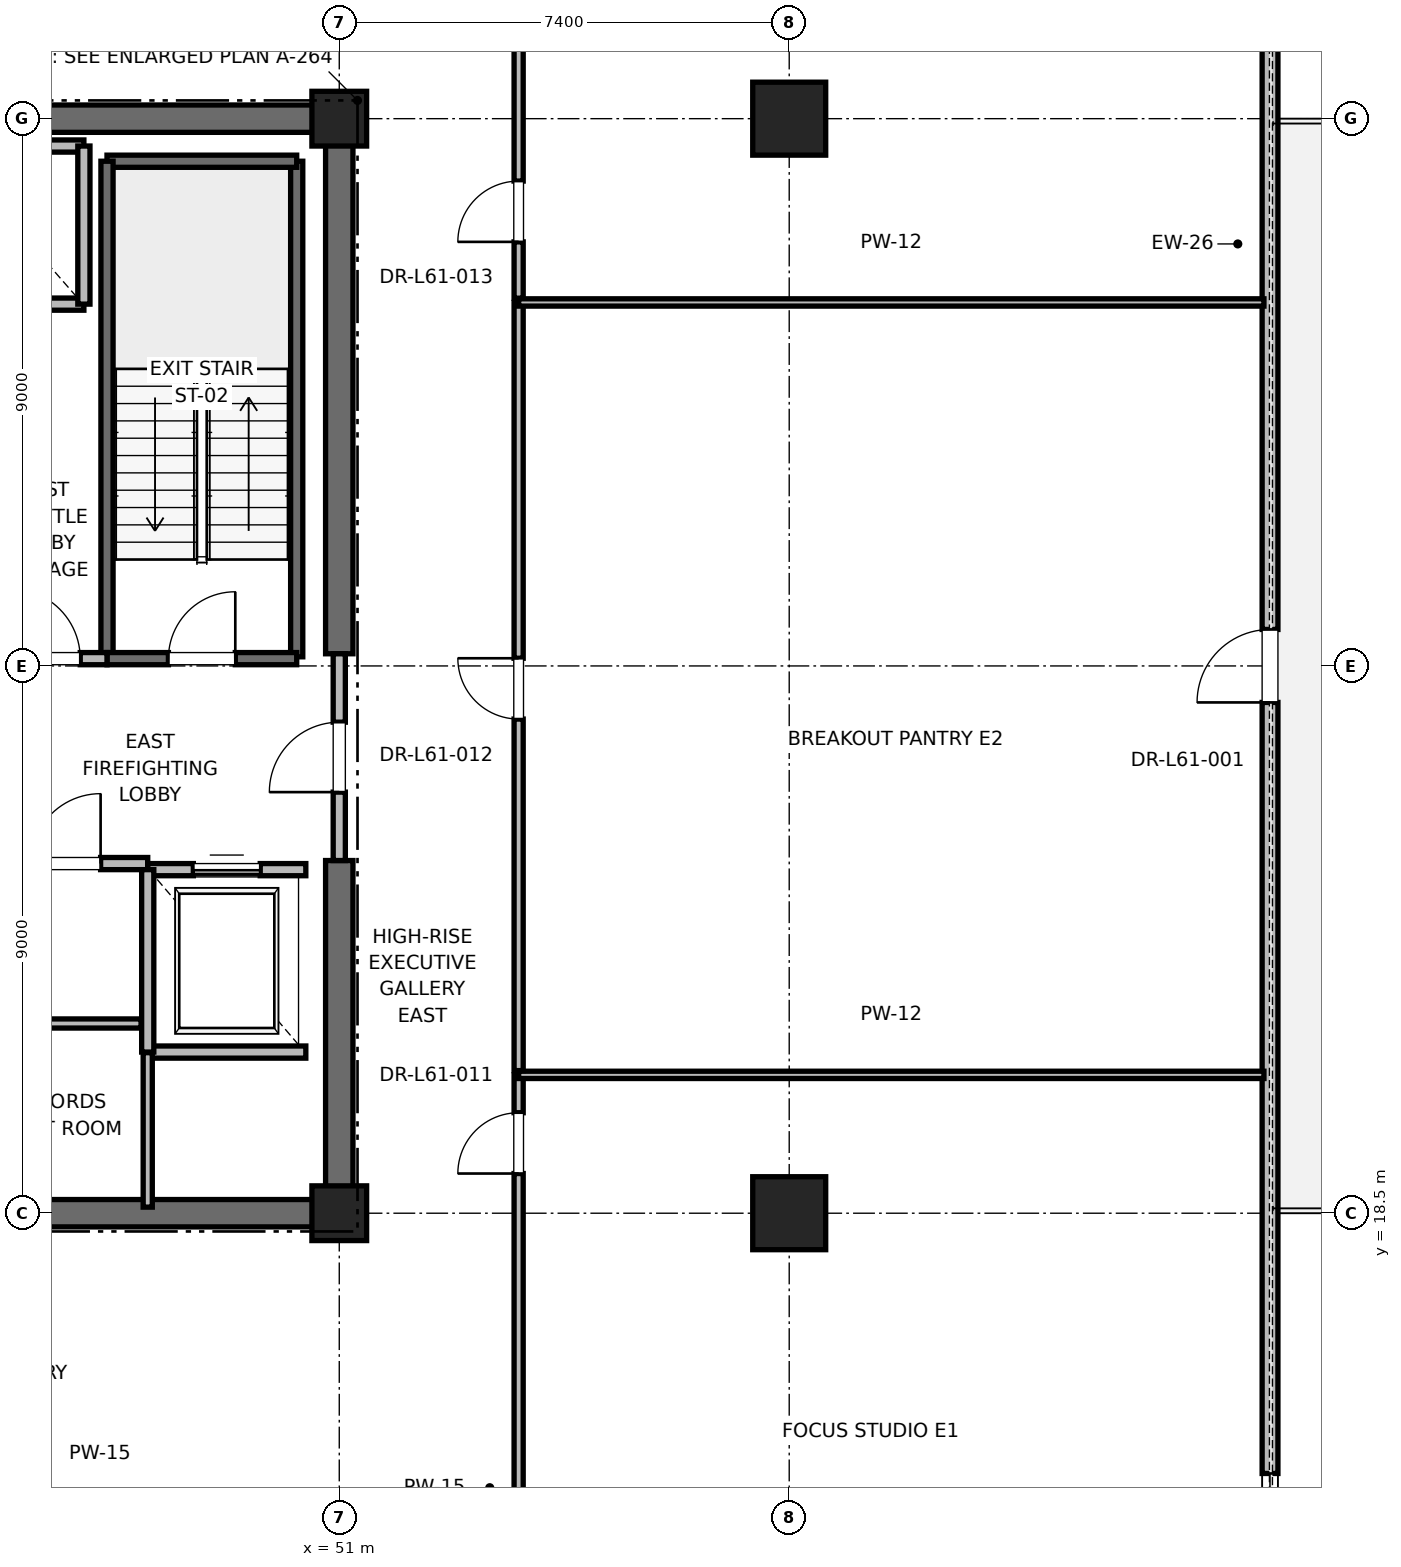
"""IFC4 building model, lengths in metres.
Left out: names, types, materials, properties, quantities, classifications, styles, units other than length and angle.
Written with IfcOpenShell. Run it as: python <this file> out.ifc"""

import sys

from ifc_helpers import new_model, si_unit, direction, frame, frame_2d, origin, origin_2d, place, context, subcontext, project, spatial, rectangle, extrude, element, fill, save


model = new_model("IFC4")
c1 = context("Model", 3, precision=1e-05, world=origin(), true_north=direction((0.0, 1.0)))
c2 = subcontext(c1, "Body", "Model", "MODEL_VIEW")
j1 = project(units=[si_unit("LENGTHUNIT", "METRE"), si_unit("PLANEANGLEUNIT", "RADIAN")], contexts=[c1])
p1 = place(None, origin())
s1 = spatial("IfcSite", under=j1, at=p1, CompositionType="ELEMENT")
p2 = place(p1, origin())
s2 = spatial("IfcBuilding", under=s1, at=p2, CompositionType="ELEMENT")
p3 = place(p2, frame((0.0, 0.0, 263.2)))
s3 = spatial("IfcBuildingStorey", under=s2, at=p3, CompositionType="ELEMENT", Elevation=263.2)
for number, where, z_axis, x_axis in (
    (1, (58.4, 18.5, 0.0), (0.0, 0.0, 1.0), (1.0, 0.0, 0.0)),
    (2, (58.4, 36.5, 0.0), (0.0, 0.0, 1.0), (1.0, 0.0, 0.0)),
):
    element("IfcColumn", number, at=place(p3, frame(where, z_axis=z_axis, x_axis=x_axis)), inside=s3, PredefinedType="COLUMN", context=c2, shape_type="SweptSolid", body=[
        extrude(rectangle(XDim=1.2, YDim=1.2, at=origin_2d()), origin(), (0.0, 0.0, 1.0), 4.0),
    ])
for number, where, z_axis, x_axis in (
    (3, (51.0, 18.5, 0.0), (0.0, 0.0, 1.0), (1.0, 0.0, 0.0)),
    (4, (51.0, 36.5, 0.0), (0.0, 0.0, 1.0), (1.0, 0.0, 0.0)),
):
    element("IfcColumn", number, at=place(p3, frame(where, z_axis=z_axis, x_axis=x_axis)), inside=s3, PredefinedType="PILASTER", context=c2, shape_type="SweptSolid", body=[
        extrude(rectangle(XDim=0.9, YDim=0.9, at=origin_2d()), origin(), (0.0, 0.0, 1.0), 4.0),
    ])
p4 = place(p3, frame((41.8, 18.5, 0.0), z_axis=(0.0, 0.0, 1.0), x_axis=(1.0, 0.0, 0.0)))
e5 = element("IfcWall", 5, at=p4, inside=s3, PredefinedType="SHEAR", context=c2, shape_type="SweptSolid", body=[
    extrude(rectangle(XDim=9.2, YDim=0.45, at=frame_2d((4.6, 0.0))), origin(), (0.0, 0.0, 1.0), 3.785),
])
for number, where, z_axis, x_axis in (
    (6, (45.2, 36.5, 0.0), (0.0, 0.0, 1.0), (1.0, 0.0, 0.0)),
    (7, (51.0, 18.5, 0.0), (0.0, 0.0, 1.0), (0.0, 1.0, 0.0)),
):
    element("IfcWall", number, at=place(p3, frame(where, z_axis=z_axis, x_axis=x_axis)), inside=s3, PredefinedType="SHEAR", context=c2, shape_type="SweptSolid", body=[
        extrude(rectangle(XDim=5.8, YDim=0.45, at=frame_2d((2.9, 0.0))), origin(), (0.0, 0.0, 1.0), 3.785),
    ])
p5 = place(p3, frame((51.0, 27.7, 0.0), z_axis=(0.0, 0.0, 1.0), x_axis=(0.0, 1.0, 0.0)))
e8 = element("IfcWall", 8, at=p5, inside=s3, PredefinedType="SHEAR", context=c2, shape_type="SweptSolid", body=[
    extrude(rectangle(XDim=8.8, YDim=0.45, at=frame_2d((4.4, 0.0))), origin(), (0.0, 0.0, 1.0), 3.785),
])
p6 = place(p3, frame((66.308, 8.42, 0.0), z_axis=(0.0, 0.0, 1.0), x_axis=(0.0, 1.0, 0.0)))
e9 = element("IfcWall", 9, at=p6, inside=s3, PredefinedType="PARAPET", context=c2, shape_type="SweptSolid", body=[
    extrude(rectangle(XDim=38.16, YDim=0.26, at=frame_2d((19.08, 0.0))), origin(), (0.0, 0.0, 1.0), 3.123),
])
p7 = place(p6, frame((4.2, 0.0, 0.85)))
e10 = element("IfcOpeningElement", 10, at=p7, cuts=e9, PredefinedType="OPENING", context=c2, shape_type="SweptSolid", body=[
    extrude(rectangle(XDim=1.6, YDim=2.1, at=frame_2d((0.8, 1.05))), frame((0.0, 0.13, 0.0), z_axis=(0.0, -1.0, 0.0), x_axis=(1.0, 0.0, 0.0)), (0.0, 0.0, 1.0), 0.26),
])
p8 = place(p6, frame((18.48, 0.0, 0.0)))
e11 = element("IfcOpeningElement", 11, at=p8, cuts=e9, PredefinedType="OPENING", context=c2, shape_type="SweptSolid", body=[
    extrude(rectangle(XDim=1.2, YDim=2.2, at=frame_2d((0.6, 1.1))), frame((0.0, 0.13, 0.0), z_axis=(0.0, -1.0, 0.0), x_axis=(1.0, 0.0, 0.0)), (0.0, 0.0, 1.0), 0.26),
])
p9 = place(p6, frame((32.36, 0.0, 0.85)))
e12 = element("IfcOpeningElement", 12, at=p9, cuts=e9, PredefinedType="OPENING", context=c2, shape_type="SweptSolid", body=[
    extrude(rectangle(XDim=1.6, YDim=2.1, at=frame_2d((0.8, 1.05))), frame((0.0, 0.13, 0.0), z_axis=(0.0, -1.0, 0.0), x_axis=(1.0, 0.0, 0.0)), (0.0, 0.0, 1.0), 0.26),
])
p10 = place(p3, frame((50.3, 27.65, 0.0), z_axis=(0.0, 0.0, 1.0), x_axis=(0.0, 1.0, 0.0)))
e13 = element("IfcWall", 13, at=p10, inside=s3, PredefinedType="SOLIDWALL", context=c2, shape_type="SweptSolid", body=[
    extrude(rectangle(XDim=8.15, YDim=0.2, at=frame_2d((4.075, 0.0))), origin(), (0.0, 0.0, 1.0), 3.785),
])
p11 = place(p3, frame((47.18, 35.8, 0.0), z_axis=(0.0, 0.0, 1.0), x_axis=(1.0, 0.0, 0.0)))
e14 = element("IfcWall", 14, at=p11, inside=s3, PredefinedType="SOLIDWALL", context=c2, shape_type="SweptSolid", body=[
    extrude(rectangle(XDim=3.12, YDim=0.2, at=frame_2d((1.56, 0.0))), origin(), (0.0, 0.0, 1.0), 3.785),
])
p12 = place(p3, frame((47.18, 27.62, 0.0), z_axis=(0.0, 0.0, 1.0), x_axis=(0.0, 1.0, 0.0)))
e15 = element("IfcWall", 15, at=p12, inside=s3, PredefinedType="SOLIDWALL", context=c2, shape_type="SweptSolid", body=[
    extrude(rectangle(XDim=8.18, YDim=0.2, at=frame_2d((4.09, 0.0))), origin(), (0.0, 0.0, 1.0), 3.785),
])
p13 = place(p3, frame((47.18, 27.62, 0.0), z_axis=(0.0, 0.0, 1.0), x_axis=(1.0, 0.0, 0.0)))
e16 = element("IfcWall", 16, at=p13, inside=s3, PredefinedType="SOLIDWALL", context=c2, shape_type="SweptSolid", body=[
    extrude(rectangle(XDim=3.12, YDim=0.2, at=frame_2d((1.56, 0.0))), origin(), (0.0, 0.0, 1.0), 3.785),
])
p14 = place(p13, frame((1.01, 0.0, 0.0)))
e17 = element("IfcOpeningElement", 17, at=p14, cuts=e16, PredefinedType="OPENING", context=c2, shape_type="SweptSolid", body=[
    extrude(rectangle(XDim=1.1, YDim=2.15, at=frame_2d((0.55, 1.075))), frame((0.0, 0.1, 0.0), z_axis=(0.0, -1.0, 0.0), x_axis=(1.0, 0.0, 0.0)), (0.0, 0.0, 1.0), 0.2),
])
p15 = place(p3, frame((45.15, 24.25, 0.0), z_axis=(0.0, 0.0, 1.0), x_axis=(1.0, 0.0, 0.0)))
e18 = element("IfcWall", 18, at=p15, inside=s3, PredefinedType="PARTITIONING", context=c2, shape_type="SweptSolid", body=[
    extrude(rectangle(XDim=2.7, YDim=0.2, at=frame_2d((1.35, 0.0))), origin(), (0.0, 0.0, 1.0), 3.785),
])
p16 = place(p15, frame((0.775, 0.0, 0.0)))
e19 = element("IfcOpeningElement", 19, at=p16, cuts=e18, PredefinedType="OPENING", context=c2, shape_type="SweptSolid", body=[
    extrude(rectangle(XDim=1.15, YDim=2.2, at=frame_2d((0.575, 1.1))), frame((0.0, 0.1, 0.0), z_axis=(0.0, -1.0, 0.0), x_axis=(1.0, 0.0, 0.0)), (0.0, 0.0, 1.0), 0.2),
])
p17 = place(p3, frame((45.15, 27.62, 0.0), z_axis=(0.0, 0.0, 1.0), x_axis=(1.0, 0.0, 0.0)))
e20 = element("IfcWall", 20, at=p17, inside=s3, PredefinedType="PARTITIONING", context=c2, shape_type="SweptSolid", body=[
    extrude(rectangle(XDim=2.03, YDim=0.2, at=frame_2d((1.015, 0.0))), origin(), (0.0, 0.0, 1.0), 3.785),
])
p18 = place(p17, frame((0.44, 0.0, 0.0)))
e21 = element("IfcOpeningElement", 21, at=p18, cuts=e20, PredefinedType="OPENING", context=c2, shape_type="SweptSolid", body=[
    extrude(rectangle(XDim=1.15, YDim=2.2, at=frame_2d((0.575, 1.1))), frame((0.0, 0.1, 0.0), z_axis=(0.0, -1.0, 0.0), x_axis=(1.0, 0.0, 0.0)), (0.0, 0.0, 1.0), 0.2),
])
p19 = place(p3, frame((51.0, 24.3, 0.0), z_axis=(0.0, 0.0, 1.0), x_axis=(0.0, 1.0, 0.0)))
e22 = element("IfcWall", 22, at=p19, inside=s3, PredefinedType="PARTITIONING", context=c2, shape_type="SweptSolid", body=[
    extrude(rectangle(XDim=3.4, YDim=0.2, at=frame_2d((1.7, 0.0))), origin(), (0.0, 0.0, 1.0), 2.865),
])
p20 = place(p19, frame((1.125, 0.0, 0.0)))
e23 = element("IfcOpeningElement", 23, at=p20, cuts=e22, PredefinedType="OPENING", context=c2, shape_type="SweptSolid", body=[
    extrude(rectangle(XDim=1.15, YDim=2.2, at=frame_2d((0.575, 1.1))), frame((0.0, 0.1, 0.0), z_axis=(0.0, -1.0, 0.0), x_axis=(1.0, 0.0, 0.0)), (0.0, 0.0, 1.0), 0.2),
])
p21 = place(p3, frame((47.85, 21.15, 0.0), z_axis=(0.0, 0.0, 1.0), x_axis=(1.0, 0.0, 0.0)))
e24 = element("IfcWall", 24, at=p21, inside=s3, PredefinedType="SOLIDWALL", context=c2, shape_type="SweptSolid", body=[
    extrude(rectangle(XDim=2.6, YDim=0.2, at=frame_2d((1.3, 0.0))), origin(), (0.0, 0.0, 1.0), 3.785),
])
p22 = place(p3, frame((50.45, 24.15, 0.0), z_axis=(0.0, 0.0, 1.0), x_axis=(-1.0, 0.0, 0.0)))
e25 = element("IfcWall", 25, at=p22, inside=s3, PredefinedType="SOLIDWALL", context=c2, shape_type="SweptSolid", body=[
    extrude(rectangle(XDim=2.6, YDim=0.2, at=frame_2d((1.3, 0.0))), origin(), (0.0, 0.0, 1.0), 2.865),
])
p23 = place(p22, frame((0.75, 0.0, 0.0)))
e26 = element("IfcOpeningElement", 26, at=p23, cuts=e25, PredefinedType="OPENING", context=c2, shape_type="SweptSolid", body=[
    extrude(rectangle(XDim=1.1, YDim=2.2, at=frame_2d((0.55, 1.1))), frame((0.0, 0.1, 0.0), z_axis=(0.0, -1.0, 0.0), x_axis=(1.0, 0.0, 0.0)), (0.0, 0.0, 1.0), 0.2),
])
p24 = place(p3, frame((47.85, 24.15, 0.0), z_axis=(0.0, 0.0, 1.0), x_axis=(0.0, -1.0, 0.0)))
e27 = element("IfcWall", 27, at=p24, inside=s3, PredefinedType="SOLIDWALL", context=c2, shape_type="SweptSolid", body=[
    extrude(rectangle(XDim=3.0, YDim=0.2, at=frame_2d((1.5, 0.0))), origin(), (0.0, 0.0, 1.0), 3.785),
])
p25 = place(p3, frame((44.5, 33.45, 0.0), z_axis=(0.0, 0.0, 1.0), x_axis=(1.0, 0.0, 0.0)))
e28 = element("IfcWall", 28, at=p25, inside=s3, PredefinedType="SOLIDWALL", context=c2, shape_type="SweptSolid", body=[
    extrude(rectangle(XDim=2.3, YDim=0.2, at=frame_2d((1.15, 0.0))), origin(), (0.0, 0.0, 1.0), 3.785),
])
p26 = place(p3, frame((46.8, 36.05, 0.0), z_axis=(0.0, 0.0, 1.0), x_axis=(-1.0, 0.0, 0.0)))
e29 = element("IfcWall", 29, at=p26, inside=s3, PredefinedType="SOLIDWALL", context=c2, shape_type="SweptSolid", body=[
    extrude(rectangle(XDim=2.3, YDim=0.2, at=frame_2d((1.15, 0.0))), origin(), (0.0, 0.0, 1.0), 2.865),
])
p27 = place(p3, frame((46.8, 33.45, 0.0), z_axis=(0.0, 0.0, 1.0), x_axis=(0.0, 1.0, 0.0)))
e30 = element("IfcWall", 30, at=p27, inside=s3, PredefinedType="SOLIDWALL", context=c2, shape_type="SweptSolid", body=[
    extrude(rectangle(XDim=2.6, YDim=0.2, at=frame_2d((1.3, 0.0))), origin(), (0.0, 0.0, 1.0), 3.785),
])
p28 = place(p3, frame((47.85, 18.6, 0.0), z_axis=(0.0, 0.0, 1.0), x_axis=(0.0, 1.0, 0.0)))
e31 = element("IfcWall", 31, at=p28, inside=s3, PredefinedType="PARTITIONING", context=c2, shape_type="SweptSolid", body=[
    extrude(rectangle(XDim=2.54, YDim=0.15, at=frame_2d((1.27, 0.0))), origin(), (0.0, 0.0, 1.0), 2.85),
])
p29 = place(p3, frame((41.76, 21.62, 0.0), z_axis=(0.0, 0.0, 1.0), x_axis=(1.0, 0.0, 0.0)))
e32 = element("IfcWall", 32, at=p29, inside=s3, PredefinedType="PARTITIONING", context=c2, shape_type="SweptSolid", body=[
    extrude(rectangle(XDim=5.98, YDim=0.15, at=frame_2d((2.99, 0.0))), origin(), (0.0, 0.0, 1.0), 2.85),
])
p30 = place(p29, frame((2.49, 0.0, 0.0)))
e33 = element("IfcOpeningElement", 33, at=p30, cuts=e32, PredefinedType="OPENING", context=c2, shape_type="SweptSolid", body=[
    extrude(rectangle(XDim=1.0, YDim=2.15, at=frame_2d((0.5, 1.075))), frame((0.0, 0.075, 0.0), z_axis=(0.0, -1.0, 0.0), x_axis=(1.0, 0.0, 0.0)), (0.0, 0.0, 1.0), 0.15),
])
p31 = place(p3, frame((53.95, 8.82, 0.0), z_axis=(0.0, 0.0, 1.0), x_axis=(0.0, 1.0, 0.0)))
e34 = element("IfcWall", 34, at=p31, inside=s3, PredefinedType="PARTITIONING", context=c2, shape_type="SweptSolid", body=[
    extrude(rectangle(XDim=11.955, YDim=0.15, at=frame_2d((5.978, 0.0))), origin(), (0.0, 0.0, 1.0), 2.85),
])
p32 = place(p31, frame((10.333, 0.0, 0.0)))
e35 = element("IfcOpeningElement", 35, at=p32, cuts=e34, PredefinedType="OPENING", context=c2, shape_type="SweptSolid", body=[
    extrude(rectangle(XDim=1.0, YDim=2.15, at=frame_2d((0.5, 1.075))), frame((0.0, 0.075, 0.0), z_axis=(0.0, -1.0, 0.0), x_axis=(1.0, 0.0, 0.0)), (0.0, 0.0, 1.0), 0.15),
])
p33 = place(p3, frame((53.95, 20.775, 0.0), z_axis=(0.0, 0.0, 1.0), x_axis=(1.0, 0.0, 0.0)))
e36 = element("IfcWall", 36, at=p33, inside=s3, PredefinedType="PARTITIONING", context=c2, shape_type="SweptSolid", body=[
    extrude(rectangle(XDim=12.258, YDim=0.12, at=frame_2d((6.129, 0.0))), origin(), (0.0, 0.0, 1.0), 2.85),
])
p34 = place(p3, frame((53.95, 20.845, 0.0), z_axis=(0.0, 0.0, 1.0), x_axis=(0.0, 1.0, 0.0)))
e37 = element("IfcWall", 37, at=p34, inside=s3, PredefinedType="PARTITIONING", context=c2, shape_type="SweptSolid", body=[
    extrude(rectangle(XDim=12.632, YDim=0.15, at=frame_2d((6.316, 0.0))), origin(), (0.0, 0.0, 1.0), 2.85),
])
p35 = place(p34, frame((5.781, 0.0, 0.0)))
e38 = element("IfcOpeningElement", 38, at=p35, cuts=e37, PredefinedType="OPENING", context=c2, shape_type="SweptSolid", body=[
    extrude(rectangle(XDim=1.0, YDim=2.15, at=frame_2d((0.5, 1.075))), frame((0.0, 0.075, 0.0), z_axis=(0.0, -1.0, 0.0), x_axis=(1.0, 0.0, 0.0)), (0.0, 0.0, 1.0), 0.15),
])
p36 = place(p3, frame((53.95, 33.478, 0.0), z_axis=(0.0, 0.0, 1.0), x_axis=(1.0, 0.0, 0.0)))
e39 = element("IfcWall", 39, at=p36, inside=s3, PredefinedType="PARTITIONING", context=c2, shape_type="SweptSolid", body=[
    extrude(rectangle(XDim=12.258, YDim=0.12, at=frame_2d((6.129, 0.0))), origin(), (0.0, 0.0, 1.0), 2.85),
])
p37 = place(p3, frame((53.95, 33.548, 0.0), z_axis=(0.0, 0.0, 1.0), x_axis=(0.0, 1.0, 0.0)))
e40 = element("IfcWall", 40, at=p37, inside=s3, PredefinedType="PARTITIONING", context=c2, shape_type="SweptSolid", body=[
    extrude(rectangle(XDim=12.632, YDim=0.15, at=frame_2d((6.316, 0.0))), origin(), (0.0, 0.0, 1.0), 2.85),
])
p38 = place(p37, frame((0.926, 0.0, 0.0)))
e41 = element("IfcOpeningElement", 41, at=p38, cuts=e40, PredefinedType="OPENING", context=c2, shape_type="SweptSolid", body=[
    extrude(rectangle(XDim=1.0, YDim=2.15, at=frame_2d((0.5, 1.075))), frame((0.0, 0.075, 0.0), z_axis=(0.0, -1.0, 0.0), x_axis=(1.0, 0.0, 0.0)), (0.0, 0.0, 1.0), 0.15),
])
p39 = place(p7, origin())
e42 = element("IfcWindow", 42, at=p39, inside=s3, PartitioningType="SINGLE_PANEL", PredefinedType="WINDOW", context=c2, shape_type="SweptSolid", body=[
    extrude(rectangle(XDim=1.6, YDim=2.1, at=frame_2d((0.8, 1.05))), frame((0.0, 0.03, 0.0), z_axis=(0.0, -1.0, 0.0), x_axis=(1.0, 0.0, 0.0)), (0.0, 0.0, 1.0), 0.06),
])
fill(e10, e42)
p40 = place(p8, origin())
e43 = element("IfcDoor", 43, at=p40, inside=s3, OperationType="SINGLE_SWING_LEFT", PredefinedType="DOOR", context=c2, shape_type="SweptSolid", body=[
    extrude(rectangle(XDim=1.2, YDim=2.2, at=frame_2d((0.6, 1.1))), frame((0.0, 0.025, 0.0), z_axis=(0.0, -1.0, 0.0), x_axis=(1.0, 0.0, 0.0)), (0.0, 0.0, 1.0), 0.05),
])
fill(e11, e43)
p41 = place(p14, origin())
e44 = element("IfcDoor", 44, at=p41, inside=s3, OperationType="SINGLE_SWING_RIGHT", PredefinedType="DOOR", context=c2, shape_type="SweptSolid", body=[
    extrude(rectangle(XDim=1.1, YDim=2.15, at=frame_2d((0.55, 1.075))), frame((0.0, 0.025, 0.0), z_axis=(0.0, -1.0, 0.0), x_axis=(1.0, 0.0, 0.0)), (0.0, 0.0, 1.0), 0.05),
])
fill(e17, e44)
p42 = place(p16, origin())
e45 = element("IfcDoor", 45, at=p42, inside=s3, OperationType="SINGLE_SWING_RIGHT", PredefinedType="DOOR", context=c2, shape_type="SweptSolid", body=[
    extrude(rectangle(XDim=1.15, YDim=2.2, at=frame_2d((0.575, 1.1))), frame((0.0, 0.025, 0.0), z_axis=(0.0, -1.0, 0.0), x_axis=(1.0, 0.0, 0.0)), (0.0, 0.0, 1.0), 0.05),
])
fill(e19, e45)
p43 = place(p18, origin())
e46 = element("IfcDoor", 46, at=p43, inside=s3, OperationType="SINGLE_SWING_LEFT", PredefinedType="DOOR", context=c2, shape_type="SweptSolid", body=[
    extrude(rectangle(XDim=1.15, YDim=2.2, at=frame_2d((0.575, 1.1))), frame((0.0, 0.025, 0.0), z_axis=(0.0, -1.0, 0.0), x_axis=(1.0, 0.0, 0.0)), (0.0, 0.0, 1.0), 0.05),
])
fill(e21, e46)
p44 = place(p20, origin())
e47 = element("IfcDoor", 47, at=p44, inside=s3, OperationType="SINGLE_SWING_LEFT", PredefinedType="DOOR", context=c2, shape_type="SweptSolid", body=[
    extrude(rectangle(XDim=1.15, YDim=2.2, at=frame_2d((0.575, 1.1))), frame((0.0, 0.025, 0.0), z_axis=(0.0, -1.0, 0.0), x_axis=(1.0, 0.0, 0.0)), (0.0, 0.0, 1.0), 0.05),
])
fill(e23, e47)
p45 = place(p23, origin())
e48 = element("IfcDoor", 48, at=p45, inside=s3, OperationType="SLIDING_TO_RIGHT", PredefinedType="DOOR", context=c2, shape_type="SweptSolid", body=[
    extrude(rectangle(XDim=1.1, YDim=2.2, at=frame_2d((0.55, 1.1))), frame((0.0, 0.025, 0.0), z_axis=(0.0, -1.0, 0.0), x_axis=(1.0, 0.0, 0.0)), (0.0, 0.0, 1.0), 0.05),
])
fill(e26, e48)
p46 = place(p32, origin())
e49 = element("IfcDoor", 49, at=p46, inside=s3, OperationType="SINGLE_SWING_LEFT", PredefinedType="DOOR", context=c2, shape_type="SweptSolid", body=[
    extrude(rectangle(XDim=1.0, YDim=2.15, at=frame_2d((0.5, 1.075))), frame((0.0, 0.025, 0.0), z_axis=(0.0, -1.0, 0.0), x_axis=(1.0, 0.0, 0.0)), (0.0, 0.0, 1.0), 0.05),
])
fill(e35, e49)
p47 = place(p35, origin())
e50 = element("IfcDoor", 50, at=p47, inside=s3, OperationType="SINGLE_SWING_RIGHT", PredefinedType="DOOR", context=c2, shape_type="SweptSolid", body=[
    extrude(rectangle(XDim=1.0, YDim=2.15, at=frame_2d((0.5, 1.075))), frame((0.0, 0.025, 0.0), z_axis=(0.0, -1.0, 0.0), x_axis=(1.0, 0.0, 0.0)), (0.0, 0.0, 1.0), 0.05),
])
fill(e38, e50)
p48 = place(p38, origin())
e51 = element("IfcDoor", 51, at=p48, inside=s3, OperationType="SINGLE_SWING_LEFT", PredefinedType="DOOR", context=c2, shape_type="SweptSolid", body=[
    extrude(rectangle(XDim=1.0, YDim=2.15, at=frame_2d((0.5, 1.075))), frame((0.0, 0.025, 0.0), z_axis=(0.0, -1.0, 0.0), x_axis=(1.0, 0.0, 0.0)), (0.0, 0.0, 1.0), 0.05),
])
fill(e41, e51)
save(model, sys.argv[1])
